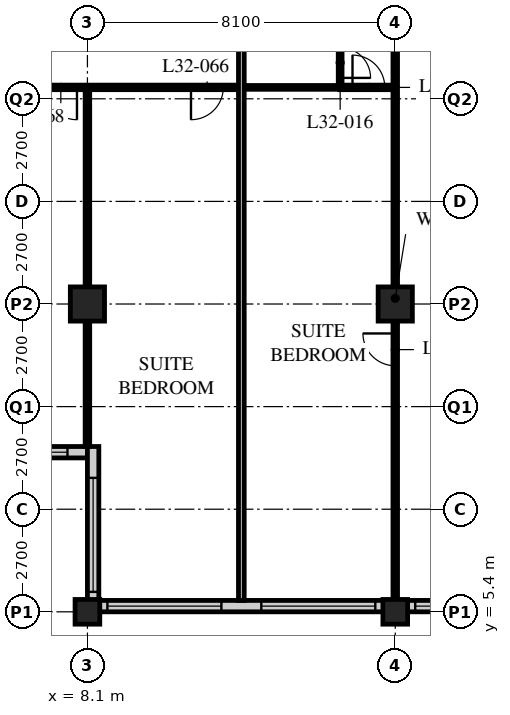
"""IFC4 building model, lengths in metres.
Left out: names, types, materials, properties, quantities, classifications, styles, units other than length and angle.
Written with IfcOpenShell. Run it as: python <this file> out.ifc"""

import sys

from ifc_helpers import new_model, si_unit, direction, frame, frame_2d, origin, origin_2d, place, context, subcontext, project, spatial, rectangle, hollow_rectangle, extrude, element, fill, save


model = new_model("IFC4")
c1 = context("Model", 3, precision=1e-05, world=origin(), true_north=direction((0.0, 1.0)))
c2 = subcontext(c1, "Body", "Model", "MODEL_VIEW")
j1 = project(units=[si_unit("LENGTHUNIT", "METRE"), si_unit("PLANEANGLEUNIT", "RADIAN")], contexts=[c1])
p1 = place(None, origin())
s1 = spatial("IfcSite", under=j1, at=p1, CompositionType="ELEMENT")
p2 = place(p1, origin())
s2 = spatial("IfcBuilding", under=s1, at=p2, CompositionType="ELEMENT")
p3 = place(p2, frame((0.0, 0.0, 127.2)))
s3 = spatial("IfcBuildingStorey", under=s2, at=p3, CompositionType="ELEMENT", Elevation=127.2)
p4 = place(p3, frame((8.1, 5.4, 0.0), z_axis=(0.0, 0.0, 1.0), x_axis=(1.0, 0.0, 0.0)))
e1 = element("IfcColumn", 1, at=p4, inside=s3, PredefinedType="COLUMN", context=c2, shape_type="SweptSolid", body=[
    extrude(hollow_rectangle(XDim=0.65, YDim=0.65, WallThickness=0.055, at=origin_2d()), origin(), (0.0, 0.0, 1.0), 3.4),
])
p5 = place(p3, frame((8.1, 13.5, 0.0), z_axis=(0.0, 0.0, 1.0), x_axis=(1.0, 0.0, 0.0)))
e2 = element("IfcColumn", 2, at=p5, inside=s3, PredefinedType="COLUMN", context=c2, shape_type="SweptSolid", body=[
    extrude(hollow_rectangle(XDim=0.9, YDim=0.9, WallThickness=0.09, at=origin_2d()), origin(), (0.0, 0.0, 1.0), 3.4),
])
p6 = place(p3, frame((16.2, 5.4, 0.0), z_axis=(0.0, 0.0, 1.0), x_axis=(1.0, 0.0, 0.0)))
e3 = element("IfcColumn", 3, at=p6, inside=s3, PredefinedType="COLUMN", context=c2, shape_type="SweptSolid", body=[
    extrude(hollow_rectangle(XDim=0.65, YDim=0.65, WallThickness=0.055, at=origin_2d()), origin(), (0.0, 0.0, 1.0), 3.4),
])
p7 = place(p3, frame((16.2, 13.5, 0.0), z_axis=(0.0, 0.0, 1.0), x_axis=(1.0, 0.0, 0.0)))
e4 = element("IfcColumn", 4, at=p7, inside=s3, PredefinedType="COLUMN", context=c2, shape_type="SweptSolid", body=[
    extrude(hollow_rectangle(XDim=0.9, YDim=0.9, WallThickness=0.09, at=origin_2d()), origin(), (0.0, 0.0, 1.0), 3.4),
])
p8 = place(p3, frame((8.4, 5.55, 0.0), z_axis=(0.0, 0.0, 1.0), x_axis=(1.0, 0.0, 0.0)))
e5 = element("IfcWall", 5, at=p8, inside=s3, PredefinedType="SOLIDWALL", context=c2, shape_type="SweptSolid", body=[
    extrude(rectangle(XDim=40.2, YDim=0.3, at=frame_2d((20.1, 0.0))), origin(), (0.0, 0.0, 1.0), 3.19),
])
p9 = place(p8, frame((0.225, 0.0, 0.9)))
e6 = element("IfcOpeningElement", 6, at=p9, cuts=e5, PredefinedType="OPENING", context=c2, shape_type="SweptSolid", body=[
    extrude(rectangle(XDim=3.0, YDim=2.0, at=frame_2d((1.5, 1.0))), frame((0.0, 0.16, 0.0), z_axis=(0.0, -1.0, 0.0), x_axis=(1.0, 0.0, 0.0)), (0.0, 0.0, 1.0), 0.32),
])
p10 = place(p8, frame((4.275, 0.0, 0.9)))
e7 = element("IfcOpeningElement", 7, at=p10, cuts=e5, PredefinedType="OPENING", context=c2, shape_type="SweptSolid", body=[
    extrude(rectangle(XDim=3.0, YDim=2.0, at=frame_2d((1.5, 1.0))), frame((0.0, 0.16, 0.0), z_axis=(0.0, -1.0, 0.0), x_axis=(1.0, 0.0, 0.0)), (0.0, 0.0, 1.0), 0.32),
])
p11 = place(p8, frame((8.325, 0.0, 0.9)))
e8 = element("IfcOpeningElement", 8, at=p11, cuts=e5, PredefinedType="OPENING", context=c2, shape_type="SweptSolid", body=[
    extrude(rectangle(XDim=3.0, YDim=2.0, at=frame_2d((1.5, 1.0))), frame((0.0, 0.16, 0.0), z_axis=(0.0, -1.0, 0.0), x_axis=(1.0, 0.0, 0.0)), (0.0, 0.0, 1.0), 0.32),
])
p12 = place(p8, frame((12.375, 0.0, 0.9)))
e9 = element("IfcOpeningElement", 9, at=p12, cuts=e5, PredefinedType="OPENING", context=c2, shape_type="SweptSolid", body=[
    extrude(rectangle(XDim=3.0, YDim=2.0, at=frame_2d((1.5, 1.0))), frame((0.0, 0.16, 0.0), z_axis=(0.0, -1.0, 0.0), x_axis=(1.0, 0.0, 0.0)), (0.0, 0.0, 1.0), 0.32),
])
p13 = place(p8, frame((16.425, 0.0, 0.9)))
e10 = element("IfcOpeningElement", 10, at=p13, cuts=e5, PredefinedType="OPENING", context=c2, shape_type="SweptSolid", body=[
    extrude(rectangle(XDim=3.0, YDim=2.0, at=frame_2d((1.5, 1.0))), frame((0.0, 0.16, 0.0), z_axis=(0.0, -1.0, 0.0), x_axis=(1.0, 0.0, 0.0)), (0.0, 0.0, 1.0), 0.32),
])
p14 = place(p8, frame((20.475, 0.0, 0.9)))
e11 = element("IfcOpeningElement", 11, at=p14, cuts=e5, PredefinedType="OPENING", context=c2, shape_type="SweptSolid", body=[
    extrude(rectangle(XDim=3.0, YDim=2.0, at=frame_2d((1.5, 1.0))), frame((0.0, 0.16, 0.0), z_axis=(0.0, -1.0, 0.0), x_axis=(1.0, 0.0, 0.0)), (0.0, 0.0, 1.0), 0.32),
])
p15 = place(p8, frame((24.525, 0.0, 0.9)))
e12 = element("IfcOpeningElement", 12, at=p15, cuts=e5, PredefinedType="OPENING", context=c2, shape_type="SweptSolid", body=[
    extrude(rectangle(XDim=3.0, YDim=2.0, at=frame_2d((1.5, 1.0))), frame((0.0, 0.16, 0.0), z_axis=(0.0, -1.0, 0.0), x_axis=(1.0, 0.0, 0.0)), (0.0, 0.0, 1.0), 0.32),
])
p16 = place(p8, frame((28.575, 0.0, 0.9)))
e13 = element("IfcOpeningElement", 13, at=p16, cuts=e5, PredefinedType="OPENING", context=c2, shape_type="SweptSolid", body=[
    extrude(rectangle(XDim=3.0, YDim=2.0, at=frame_2d((1.5, 1.0))), frame((0.0, 0.16, 0.0), z_axis=(0.0, -1.0, 0.0), x_axis=(1.0, 0.0, 0.0)), (0.0, 0.0, 1.0), 0.32),
])
p17 = place(p8, frame((32.625, 0.0, 0.9)))
e14 = element("IfcOpeningElement", 14, at=p17, cuts=e5, PredefinedType="OPENING", context=c2, shape_type="SweptSolid", body=[
    extrude(rectangle(XDim=3.0, YDim=2.0, at=frame_2d((1.5, 1.0))), frame((0.0, 0.16, 0.0), z_axis=(0.0, -1.0, 0.0), x_axis=(1.0, 0.0, 0.0)), (0.0, 0.0, 1.0), 0.32),
])
p18 = place(p8, frame((36.675, 0.0, 0.9)))
e15 = element("IfcOpeningElement", 15, at=p18, cuts=e5, PredefinedType="OPENING", context=c2, shape_type="SweptSolid", body=[
    extrude(rectangle(XDim=3.0, YDim=2.0, at=frame_2d((1.5, 1.0))), frame((0.0, 0.16, 0.0), z_axis=(0.0, -1.0, 0.0), x_axis=(1.0, 0.0, 0.0)), (0.0, 0.0, 1.0), 0.32),
])
p19 = place(p3, frame((4.35, 9.6, 0.0), z_axis=(0.0, 0.0, 1.0), x_axis=(1.0, 0.0, 0.0)))
e16 = element("IfcWall", 16, at=p19, inside=s3, PredefinedType="SOLIDWALL", context=c2, shape_type="SweptSolid", body=[
    extrude(rectangle(XDim=3.75, YDim=0.3, at=frame_2d((1.875, 0.0))), origin(), (0.0, 0.0, 1.0), 3.19),
])
p20 = place(p19, frame((0.225, 0.0, 0.9)))
e17 = element("IfcOpeningElement", 17, at=p20, cuts=e16, PredefinedType="OPENING", context=c2, shape_type="SweptSolid", body=[
    extrude(rectangle(XDim=3.0, YDim=1.5, at=frame_2d((1.5, 0.75))), frame((0.0, 0.16, 0.0), z_axis=(0.0, -1.0, 0.0), x_axis=(1.0, 0.0, 0.0)), (0.0, 0.0, 1.0), 0.32),
])
p21 = place(p3, frame((8.25, 9.75, 0.0), z_axis=(0.0, 0.0, 1.0), x_axis=(0.0, -1.0, 0.0)))
e18 = element("IfcWall", 18, at=p21, inside=s3, PredefinedType="SOLIDWALL", context=c2, shape_type="SweptSolid", body=[
    extrude(rectangle(XDim=4.35, YDim=0.3, at=frame_2d((2.175, 0.0))), origin(), (0.0, 0.0, 1.0), 3.19),
])
p22 = place(p21, frame((0.825, 0.0, 0.9)))
e19 = element("IfcOpeningElement", 19, at=p22, cuts=e18, PredefinedType="OPENING", context=c2, shape_type="SweptSolid", body=[
    extrude(rectangle(XDim=3.0, YDim=1.5, at=frame_2d((1.5, 0.75))), frame((0.0, 0.16, 0.0), z_axis=(0.0, -1.0, 0.0), x_axis=(1.0, 0.0, 0.0)), (0.0, 0.0, 1.0), 0.32),
])
p23 = place(p3, frame((12.15, 19.2, 0.0), z_axis=(0.0, 0.0, 1.0), x_axis=(1.0, 0.0, 0.0)))
e20 = element("IfcWall", 20, at=p23, inside=s3, PredefinedType="PARTITIONING", context=c2, shape_type="SweptSolid", body=[
    extrude(rectangle(XDim=2.6, YDim=0.1, at=frame_2d((1.3, 0.0))), origin(), (0.0, 0.0, 1.0), 3.19),
])
p24 = place(p3, frame((14.75, 21.6, 0.0), z_axis=(0.0, 0.0, 1.0), x_axis=(0.0, -1.0, 0.0)))
e21 = element("IfcWall", 21, at=p24, inside=s3, PredefinedType="PARTITIONING", context=c2, shape_type="SweptSolid", body=[
    extrude(rectangle(XDim=2.4, YDim=0.1, at=frame_2d((1.2, 0.0))), origin(), (0.0, 0.0, 1.0), 3.19),
])
p25 = place(p24, frame((1.35, 0.0, 0.0)))
e22 = element("IfcOpeningElement", 22, at=p25, cuts=e21, PredefinedType="OPENING", context=c2, shape_type="SweptSolid", body=[
    extrude(rectangle(XDim=0.8, YDim=2.1, at=frame_2d((0.4, 1.05))), frame((0.0, 0.06, 0.0), z_axis=(0.0, -1.0, 0.0), x_axis=(1.0, 0.0, 0.0)), (0.0, 0.0, 1.0), 0.12),
])
p26 = place(p3, frame((16.2, 21.6, 0.0), z_axis=(0.0, 0.0, 1.0), x_axis=(0.0, -1.0, 0.0)))
e23 = element("IfcWall", 23, at=p26, inside=s3, PredefinedType="PARTITIONING", context=c2, shape_type="SweptSolid", body=[
    extrude(rectangle(XDim=15.9, YDim=0.12, at=frame_2d((7.95, 0.0))), origin(), (0.0, 0.0, 1.0), 2.578),
])
p27 = place(p26, frame((8.875, 0.0, 0.0)))
e24 = element("IfcOpeningElement", 24, at=p27, cuts=e23, PredefinedType="OPENING", context=c2, shape_type="SweptSolid", body=[
    extrude(rectangle(XDim=0.85, YDim=2.1, at=frame_2d((0.425, 1.05))), frame((0.0, 0.07, 0.0), z_axis=(0.0, -1.0, 0.0), x_axis=(1.0, 0.0, 0.0)), (0.0, 0.0, 1.0), 0.14),
])
p28 = place(p3, frame((4.1, 19.2, 0.0), z_axis=(0.0, 0.0, 1.0), x_axis=(1.0, 0.0, 0.0)))
e25 = element("IfcWall", 25, at=p28, inside=s3, PredefinedType="PARTITIONING", context=c2, shape_type="SweptSolid", body=[
    extrude(rectangle(XDim=8.05, YDim=0.12, at=frame_2d((4.025, 0.0))), origin(), (0.0, 0.0, 1.0), 3.19),
])
p29 = place(p28, frame((6.725, 0.0, 0.0)))
e26 = element("IfcOpeningElement", 26, at=p29, cuts=e25, PredefinedType="OPENING", context=c2, shape_type="SweptSolid", body=[
    extrude(rectangle(XDim=0.85, YDim=2.1, at=frame_2d((0.425, 1.05))), frame((0.0, 0.07, 0.0), z_axis=(0.0, -1.0, 0.0), x_axis=(1.0, 0.0, 0.0)), (0.0, 0.0, 1.0), 0.14),
])
p30 = place(p28, frame((2.875, 0.0, 0.0)))
e27 = element("IfcOpeningElement", 27, at=p30, cuts=e25, PredefinedType="OPENING", context=c2, shape_type="SweptSolid", body=[
    extrude(rectangle(XDim=0.85, YDim=2.1, at=frame_2d((0.425, 1.05))), frame((0.0, 0.07, 0.0), z_axis=(0.0, -1.0, 0.0), x_axis=(1.0, 0.0, 0.0)), (0.0, 0.0, 1.0), 0.14),
])
p31 = place(p3, frame((8.1, 19.2, 0.0), z_axis=(0.0, 0.0, 1.0), x_axis=(0.0, -1.0, 0.0)))
e28 = element("IfcWall", 28, at=p31, inside=s3, PredefinedType="PARTITIONING", context=c2, shape_type="SweptSolid", body=[
    extrude(rectangle(XDim=9.45, YDim=0.12, at=frame_2d((4.725, 0.0))), origin(), (0.0, 0.0, 1.0), 2.578),
])
p32 = place(p3, frame((12.15, 21.6, 0.0), z_axis=(0.0, 0.0, 1.0), x_axis=(0.0, -1.0, 0.0)))
e29 = element("IfcWall", 29, at=p32, inside=s3, PredefinedType="PARTITIONING", context=c2, shape_type="SweptSolid", body=[
    extrude(rectangle(XDim=15.9, YDim=0.15, at=frame_2d((7.95, 0.0))), origin(), (0.0, 0.0, 1.0), 3.19),
])
p33 = place(p3, frame((16.2, 19.2, 0.0), z_axis=(0.0, 0.0, 1.0), x_axis=(-1.0, 0.0, 0.0)))
e30 = element("IfcWall", 30, at=p33, inside=s3, PredefinedType="PARTITIONING", context=c2, shape_type="SweptSolid", body=[
    extrude(rectangle(XDim=1.46, YDim=0.12, at=frame_2d((0.73, 0.0))), origin(), (0.0, 0.0, 1.0), 3.19),
])
p34 = place(p33, frame((0.275, 0.0, 0.0)))
e31 = element("IfcOpeningElement", 31, at=p34, cuts=e30, PredefinedType="OPENING", context=c2, shape_type="SweptSolid", body=[
    extrude(rectangle(XDim=0.85, YDim=2.1, at=frame_2d((0.425, 1.05))), frame((0.0, 0.07, 0.0), z_axis=(0.0, -1.0, 0.0), x_axis=(1.0, 0.0, 0.0)), (0.0, 0.0, 1.0), 0.14),
])
p35 = place(p9, origin())
e32 = element("IfcWindow", 32, at=p35, inside=s3, PartitioningType="SINGLE_PANEL", PredefinedType="WINDOW", context=c2, shape_type="SweptSolid", body=[
    extrude(rectangle(XDim=3.0, YDim=2.0, at=frame_2d((1.5, 1.0))), frame((0.0, 0.03, 0.0), z_axis=(0.0, -1.0, 0.0), x_axis=(1.0, 0.0, 0.0)), (0.0, 0.0, 1.0), 0.06),
])
fill(e6, e32)
p36 = place(p10, origin())
e33 = element("IfcWindow", 33, at=p36, inside=s3, PartitioningType="SINGLE_PANEL", PredefinedType="WINDOW", context=c2, shape_type="SweptSolid", body=[
    extrude(rectangle(XDim=3.0, YDim=2.0, at=frame_2d((1.5, 1.0))), frame((0.0, 0.03, 0.0), z_axis=(0.0, -1.0, 0.0), x_axis=(1.0, 0.0, 0.0)), (0.0, 0.0, 1.0), 0.06),
])
fill(e7, e33)
p37 = place(p11, origin())
e34 = element("IfcWindow", 34, at=p37, inside=s3, PartitioningType="SINGLE_PANEL", PredefinedType="WINDOW", context=c2, shape_type="SweptSolid", body=[
    extrude(rectangle(XDim=3.0, YDim=2.0, at=frame_2d((1.5, 1.0))), frame((0.0, 0.03, 0.0), z_axis=(0.0, -1.0, 0.0), x_axis=(1.0, 0.0, 0.0)), (0.0, 0.0, 1.0), 0.06),
])
fill(e8, e34)
p38 = place(p20, origin())
e35 = element("IfcWindow", 35, at=p38, inside=s3, PartitioningType="SINGLE_PANEL", PredefinedType="WINDOW", context=c2, shape_type="SweptSolid", body=[
    extrude(rectangle(XDim=3.0, YDim=1.5, at=frame_2d((1.5, 0.75))), frame((0.0, 0.03, 0.0), z_axis=(0.0, -1.0, 0.0), x_axis=(1.0, 0.0, 0.0)), (0.0, 0.0, 1.0), 0.06),
])
fill(e17, e35)
p39 = place(p22, origin())
e36 = element("IfcWindow", 36, at=p39, inside=s3, PartitioningType="SINGLE_PANEL", PredefinedType="WINDOW", context=c2, shape_type="SweptSolid", body=[
    extrude(rectangle(XDim=3.0, YDim=1.5, at=frame_2d((1.5, 0.75))), frame((0.0, 0.03, 0.0), z_axis=(0.0, -1.0, 0.0), x_axis=(1.0, 0.0, 0.0)), (0.0, 0.0, 1.0), 0.06),
])
fill(e19, e36)
p40 = place(p25, origin())
e37 = element("IfcDoor", 37, at=p40, inside=s3, OperationType="SINGLE_SWING_RIGHT", PredefinedType="DOOR", context=c2, shape_type="SweptSolid", body=[
    extrude(rectangle(XDim=0.8, YDim=2.1, at=frame_2d((0.4, 1.05))), frame((0.0, 0.025, 0.0), z_axis=(0.0, -1.0, 0.0), x_axis=(1.0, 0.0, 0.0)), (0.0, 0.0, 1.0), 0.05),
])
fill(e22, e37)
p41 = place(p27, origin())
e38 = element("IfcDoor", 38, at=p41, inside=s3, OperationType="SINGLE_SWING_RIGHT", PredefinedType="DOOR", context=c2, shape_type="SweptSolid", body=[
    extrude(rectangle(XDim=0.85, YDim=2.1, at=frame_2d((0.425, 1.05))), frame((0.0, 0.025, 0.0), z_axis=(0.0, -1.0, 0.0), x_axis=(1.0, 0.0, 0.0)), (0.0, 0.0, 1.0), 0.05),
])
fill(e24, e38)
p42 = place(p29, origin())
e39 = element("IfcDoor", 39, at=p42, inside=s3, OperationType="SINGLE_SWING_RIGHT", PredefinedType="DOOR", context=c2, shape_type="SweptSolid", body=[
    extrude(rectangle(XDim=0.85, YDim=2.1, at=frame_2d((0.425, 1.05))), frame((0.0, 0.025, 0.0), z_axis=(0.0, -1.0, 0.0), x_axis=(1.0, 0.0, 0.0)), (0.0, 0.0, 1.0), 0.05),
])
fill(e26, e39)
p43 = place(p30, origin())
e40 = element("IfcDoor", 40, at=p43, inside=s3, OperationType="SINGLE_SWING_LEFT", PredefinedType="DOOR", context=c2, shape_type="SweptSolid", body=[
    extrude(rectangle(XDim=0.85, YDim=2.1, at=frame_2d((0.425, 1.05))), frame((0.0, 0.025, 0.0), z_axis=(0.0, -1.0, 0.0), x_axis=(1.0, 0.0, 0.0)), (0.0, 0.0, 1.0), 0.05),
])
fill(e27, e40)
p44 = place(p34, origin())
e41 = element("IfcDoor", 41, at=p44, inside=s3, OperationType="SINGLE_SWING_LEFT", PredefinedType="DOOR", context=c2, shape_type="SweptSolid", body=[
    extrude(rectangle(XDim=0.85, YDim=2.1, at=frame_2d((0.425, 1.05))), frame((0.0, 0.025, 0.0), z_axis=(0.0, -1.0, 0.0), x_axis=(1.0, 0.0, 0.0)), (0.0, 0.0, 1.0), 0.05),
])
fill(e31, e41)
save(model, sys.argv[1])
